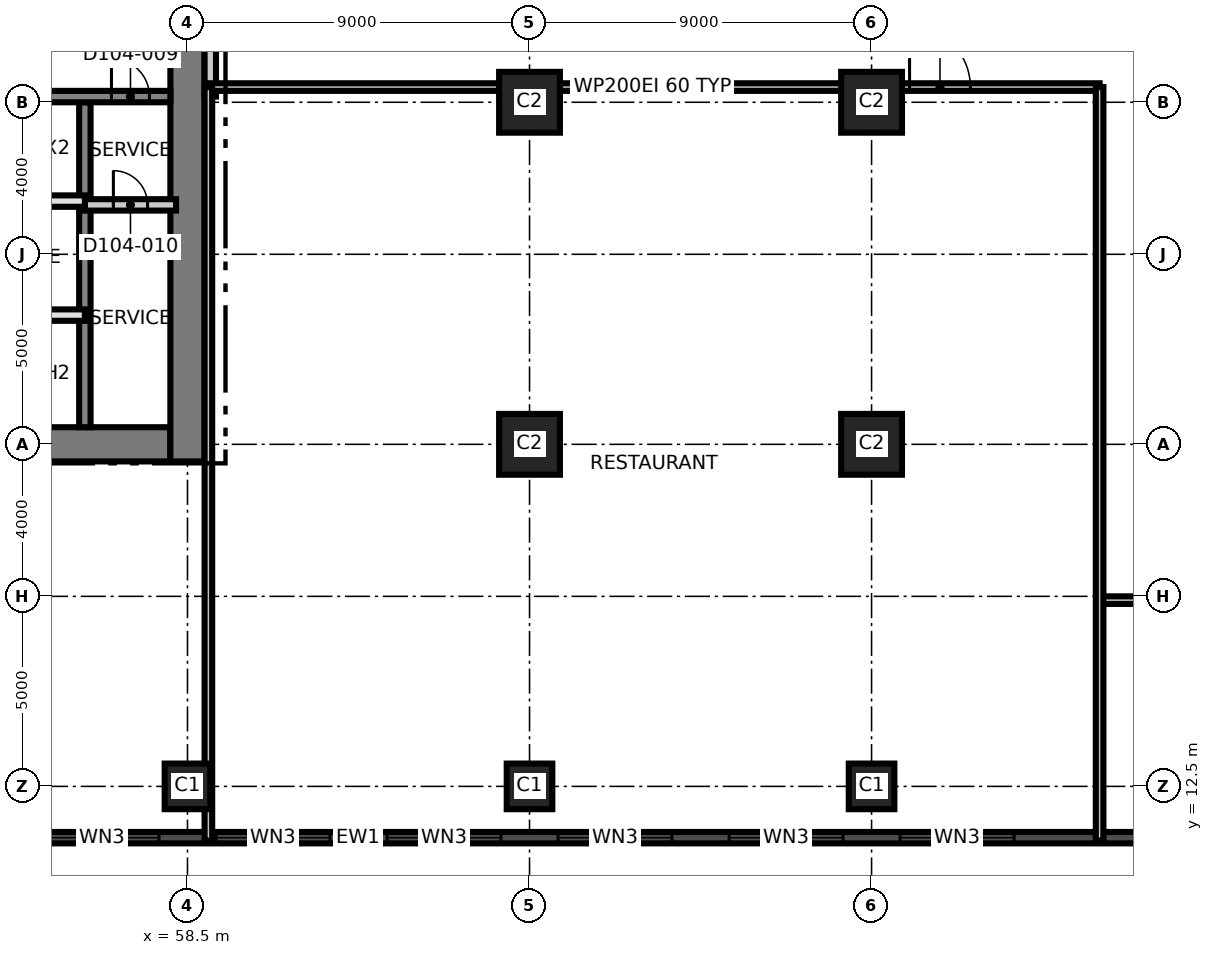
"""IFC4 building model, lengths in metres.
Left out: names, types, materials, properties, quantities, classifications, styles, units other than length and angle.
Written with IfcOpenShell. Run it as: python <this file> out.ifc"""

import sys

from ifc_helpers import new_model, si_unit, direction, frame, frame_2d, origin, origin_2d, place, context, subcontext, project, spatial, rectangle, extrude, element, fill, save


model = new_model("IFC4")
c1 = context("Model", 3, precision=1e-05, world=origin(), true_north=direction((0.0, 1.0)))
c2 = subcontext(c1, "Body", "Model", "MODEL_VIEW")
j1 = project(units=[si_unit("LENGTHUNIT", "METRE"), si_unit("PLANEANGLEUNIT", "RADIAN")], contexts=[c1])
p1 = place(None, origin())
s1 = spatial("IfcSite", under=j1, at=p1, CompositionType="ELEMENT")
p2 = place(p1, origin())
s2 = spatial("IfcBuilding", under=s1, at=p2, CompositionType="ELEMENT")
p3 = place(p2, frame((0.0, 0.0, 13.5)))
s3 = spatial("IfcBuildingStorey", under=s2, at=p3, CompositionType="ELEMENT", Elevation=13.5)
p4 = place(p3, frame((31.05, 21.5, 0.0), z_axis=(0.0, 0.0, 1.0), x_axis=(1.0, 0.0, 0.0)))
e1 = element("IfcWall", 1, at=p4, inside=s3, PredefinedType="SHEAR", context=c2, shape_type="SweptSolid", body=[
    extrude(rectangle(XDim=27.0, YDim=0.9, at=frame_2d((13.5, 0.0))), origin(), (0.0, 0.0, 1.0), 5.0),
])
p5 = place(p3, frame((58.5, 21.05, 0.0), z_axis=(0.0, 0.0, 1.0), x_axis=(0.0, 1.0, 0.0)))
e2 = element("IfcWall", 2, at=p5, inside=s3, PredefinedType="SHEAR", context=c2, shape_type="SweptSolid", body=[
    extrude(rectangle(XDim=18.9, YDim=0.9, at=frame_2d((9.45, 0.0))), origin(), (0.0, 0.0, 1.0), 5.0),
])
p6 = place(p3, frame((55.8, 21.95, 0.0), z_axis=(0.0, 0.0, 1.0), x_axis=(0.0, 1.0, 0.0)))
e3 = element("IfcWall", 3, at=p6, inside=s3, PredefinedType="SHEAR", context=c2, shape_type="SweptSolid", body=[
    extrude(rectangle(XDim=8.55, YDim=0.3, at=frame_2d((4.275, 0.0))), origin(), (0.0, 0.0, 1.0), 5.0),
])
p7 = place(p3, frame((31.95, 30.65, 0.0), z_axis=(0.0, 0.0, 1.0), x_axis=(1.0, 0.0, 0.0)))
e4 = element("IfcWall", 4, at=p7, inside=s3, PredefinedType="SHEAR", context=c2, shape_type="SweptSolid", body=[
    extrude(rectangle(XDim=26.1, YDim=0.3, at=frame_2d((13.05, 0.0))), origin(), (0.0, 0.0, 1.0), 5.0),
])
p8 = place(p7, frame((24.55, 0.0, 0.0)))
e5 = element("IfcOpeningElement", 5, at=p8, cuts=e4, PredefinedType="OPENING", context=c2, shape_type="SweptSolid", body=[
    extrude(rectangle(XDim=1.0, YDim=2.1, at=frame_2d((0.5, 1.05))), frame((0.0, 0.16, 0.0), z_axis=(0.0, -1.0, 0.0), x_axis=(1.0, 0.0, 0.0)), (0.0, 0.0, 1.0), 0.32),
])
p9 = place(p7, frame((11.35, 0.0, 0.0)))
e6 = element("IfcOpeningElement", 6, at=p9, cuts=e4, PredefinedType="OPENING", context=c2, shape_type="SweptSolid", body=[
    extrude(rectangle(XDim=1.0, YDim=2.1, at=frame_2d((0.5, 1.05))), frame((0.0, 0.16, 0.0), z_axis=(0.0, -1.0, 0.0), x_axis=(1.0, 0.0, 0.0)), (0.0, 0.0, 1.0), 0.32),
])
for number, where, z_axis, x_axis in (
    (7, (58.5, 12.5, 0.0), (0.0, 0.0, 1.0), (1.0, 0.0, 0.0)),
    (8, (67.5, 12.5, 0.0), (0.0, 0.0, 1.0), (1.0, 0.0, 0.0)),
    (9, (76.5, 12.5, 0.0), (0.0, 0.0, 1.0), (1.0, 0.0, 0.0)),
):
    element("IfcColumn", number, at=place(p3, frame(where, z_axis=z_axis, x_axis=x_axis)), inside=s3, PredefinedType="COLUMN", context=c2, shape_type="SweptSolid", body=[
        extrude(rectangle(XDim=1.2, YDim=1.2, at=origin_2d()), origin(), (0.0, 0.0, 1.0), 5.0),
    ])
for number, where, z_axis, x_axis in (
    (10, (67.5, 21.5, 0.0), (0.0, 0.0, 1.0), (1.0, 0.0, 0.0)),
    (11, (76.5, 21.5, 0.0), (0.0, 0.0, 1.0), (1.0, 0.0, 0.0)),
    (12, (67.5, 30.5, 0.0), (0.0, 0.0, 1.0), (1.0, 0.0, 0.0)),
    (13, (76.5, 30.5, 0.0), (0.0, 0.0, 1.0), (1.0, 0.0, 0.0)),
):
    element("IfcColumn", number, at=place(p3, frame(where, z_axis=z_axis, x_axis=x_axis)), inside=s3, PredefinedType="COLUMN", context=c2, shape_type="SweptSolid", body=[
        extrude(rectangle(XDim=1.6, YDim=1.6, at=origin_2d()), origin(), (0.0, 0.0, 1.0), 5.0),
    ])
p10 = place(p3, frame((27.048, 11.15, 0.0), z_axis=(0.0, 0.0, 1.0), x_axis=(1.0, 0.0, 0.0)))
e14 = element("IfcWall", 14, at=p10, inside=s3, PredefinedType="SOLIDWALL", context=c2, shape_type="SweptSolid", body=[
    extrude(rectangle(XDim=71.88, YDim=0.3, at=frame_2d((35.94, 0.0))), origin(), (0.0, 0.0, 1.0), 4.7),
])
p11 = place(p10, frame((0.726, 0.0, 0.9)))
e15 = element("IfcOpeningElement", 15, at=p11, cuts=e14, PredefinedType="OPENING", context=c2, shape_type="SweptSolid", body=[
    extrude(rectangle(XDim=3.0, YDim=2.4, at=frame_2d((1.5, 1.2))), frame((0.0, 0.16, 0.0), z_axis=(0.0, -1.0, 0.0), x_axis=(1.0, 0.0, 0.0)), (0.0, 0.0, 1.0), 0.32),
])
p12 = place(p10, frame((5.202, 0.0, 0.9)))
e16 = element("IfcOpeningElement", 16, at=p12, cuts=e14, PredefinedType="OPENING", context=c2, shape_type="SweptSolid", body=[
    extrude(rectangle(XDim=3.0, YDim=2.4, at=frame_2d((1.5, 1.2))), frame((0.0, 0.16, 0.0), z_axis=(0.0, -1.0, 0.0), x_axis=(1.0, 0.0, 0.0)), (0.0, 0.0, 1.0), 0.32),
])
p13 = place(p10, frame((9.702, 0.0, 0.9)))
e17 = element("IfcOpeningElement", 17, at=p13, cuts=e14, PredefinedType="OPENING", context=c2, shape_type="SweptSolid", body=[
    extrude(rectangle(XDim=3.0, YDim=2.4, at=frame_2d((1.5, 1.2))), frame((0.0, 0.16, 0.0), z_axis=(0.0, -1.0, 0.0), x_axis=(1.0, 0.0, 0.0)), (0.0, 0.0, 1.0), 0.32),
])
p14 = place(p10, frame((14.202, 0.0, 0.9)))
e18 = element("IfcOpeningElement", 18, at=p14, cuts=e14, PredefinedType="OPENING", context=c2, shape_type="SweptSolid", body=[
    extrude(rectangle(XDim=3.0, YDim=2.4, at=frame_2d((1.5, 1.2))), frame((0.0, 0.16, 0.0), z_axis=(0.0, -1.0, 0.0), x_axis=(1.0, 0.0, 0.0)), (0.0, 0.0, 1.0), 0.32),
])
p15 = place(p10, frame((18.702, 0.0, 0.9)))
e19 = element("IfcOpeningElement", 19, at=p15, cuts=e14, PredefinedType="OPENING", context=c2, shape_type="SweptSolid", body=[
    extrude(rectangle(XDim=3.0, YDim=2.4, at=frame_2d((1.5, 1.2))), frame((0.0, 0.16, 0.0), z_axis=(0.0, -1.0, 0.0), x_axis=(1.0, 0.0, 0.0)), (0.0, 0.0, 1.0), 0.32),
])
p16 = place(p10, frame((23.202, 0.0, 0.9)))
e20 = element("IfcOpeningElement", 20, at=p16, cuts=e14, PredefinedType="OPENING", context=c2, shape_type="SweptSolid", body=[
    extrude(rectangle(XDim=3.0, YDim=2.4, at=frame_2d((1.5, 1.2))), frame((0.0, 0.16, 0.0), z_axis=(0.0, -1.0, 0.0), x_axis=(1.0, 0.0, 0.0)), (0.0, 0.0, 1.0), 0.32),
])
p17 = place(p10, frame((27.702, 0.0, 0.9)))
e21 = element("IfcOpeningElement", 21, at=p17, cuts=e14, PredefinedType="OPENING", context=c2, shape_type="SweptSolid", body=[
    extrude(rectangle(XDim=3.0, YDim=2.4, at=frame_2d((1.5, 1.2))), frame((0.0, 0.16, 0.0), z_axis=(0.0, -1.0, 0.0), x_axis=(1.0, 0.0, 0.0)), (0.0, 0.0, 1.0), 0.32),
])
p18 = place(p10, frame((32.202, 0.0, 0.9)))
e22 = element("IfcOpeningElement", 22, at=p18, cuts=e14, PredefinedType="OPENING", context=c2, shape_type="SweptSolid", body=[
    extrude(rectangle(XDim=3.0, YDim=2.4, at=frame_2d((1.5, 1.2))), frame((0.0, 0.16, 0.0), z_axis=(0.0, -1.0, 0.0), x_axis=(1.0, 0.0, 0.0)), (0.0, 0.0, 1.0), 0.32),
])
p19 = place(p10, frame((36.702, 0.0, 0.9)))
e23 = element("IfcOpeningElement", 23, at=p19, cuts=e14, PredefinedType="OPENING", context=c2, shape_type="SweptSolid", body=[
    extrude(rectangle(XDim=3.0, YDim=2.4, at=frame_2d((1.5, 1.2))), frame((0.0, 0.16, 0.0), z_axis=(0.0, -1.0, 0.0), x_axis=(1.0, 0.0, 0.0)), (0.0, 0.0, 1.0), 0.32),
])
p20 = place(p10, frame((41.202, 0.0, 0.9)))
e24 = element("IfcOpeningElement", 24, at=p20, cuts=e14, PredefinedType="OPENING", context=c2, shape_type="SweptSolid", body=[
    extrude(rectangle(XDim=3.0, YDim=2.4, at=frame_2d((1.5, 1.2))), frame((0.0, 0.16, 0.0), z_axis=(0.0, -1.0, 0.0), x_axis=(1.0, 0.0, 0.0)), (0.0, 0.0, 1.0), 0.32),
])
p21 = place(p10, frame((45.702, 0.0, 0.9)))
e25 = element("IfcOpeningElement", 25, at=p21, cuts=e14, PredefinedType="OPENING", context=c2, shape_type="SweptSolid", body=[
    extrude(rectangle(XDim=3.0, YDim=2.4, at=frame_2d((1.5, 1.2))), frame((0.0, 0.16, 0.0), z_axis=(0.0, -1.0, 0.0), x_axis=(1.0, 0.0, 0.0)), (0.0, 0.0, 1.0), 0.32),
])
p22 = place(p10, frame((50.202, 0.0, 0.9)))
e26 = element("IfcOpeningElement", 26, at=p22, cuts=e14, PredefinedType="OPENING", context=c2, shape_type="SweptSolid", body=[
    extrude(rectangle(XDim=3.0, YDim=2.4, at=frame_2d((1.5, 1.2))), frame((0.0, 0.16, 0.0), z_axis=(0.0, -1.0, 0.0), x_axis=(1.0, 0.0, 0.0)), (0.0, 0.0, 1.0), 0.32),
])
p23 = place(p10, frame((59.202, 0.0, 0.9)))
e27 = element("IfcOpeningElement", 27, at=p23, cuts=e14, PredefinedType="OPENING", context=c2, shape_type="SweptSolid", body=[
    extrude(rectangle(XDim=3.0, YDim=2.4, at=frame_2d((1.5, 1.2))), frame((0.0, 0.16, 0.0), z_axis=(0.0, -1.0, 0.0), x_axis=(1.0, 0.0, 0.0)), (0.0, 0.0, 1.0), 0.32),
])
p24 = place(p10, frame((63.702, 0.0, 0.9)))
e28 = element("IfcOpeningElement", 28, at=p24, cuts=e14, PredefinedType="OPENING", context=c2, shape_type="SweptSolid", body=[
    extrude(rectangle(XDim=3.0, YDim=2.4, at=frame_2d((1.5, 1.2))), frame((0.0, 0.16, 0.0), z_axis=(0.0, -1.0, 0.0), x_axis=(1.0, 0.0, 0.0)), (0.0, 0.0, 1.0), 0.32),
])
p25 = place(p10, frame((68.226, 0.0, 0.9)))
e29 = element("IfcOpeningElement", 29, at=p25, cuts=e14, PredefinedType="OPENING", context=c2, shape_type="SweptSolid", body=[
    extrude(rectangle(XDim=3.0, YDim=2.4, at=frame_2d((1.5, 1.2))), frame((0.0, 0.16, 0.0), z_axis=(0.0, -1.0, 0.0), x_axis=(1.0, 0.0, 0.0)), (0.0, 0.0, 1.0), 0.32),
])
p26 = place(p3, frame((46.8, 24.9, 0.0), z_axis=(0.0, 0.0, 1.0), x_axis=(1.0, 0.0, 0.0)))
e30 = element("IfcWall", 30, at=p26, inside=s3, PredefinedType="SOLIDWALL", context=c2, shape_type="SweptSolid", body=[
    extrude(rectangle(XDim=9.0, YDim=0.3, at=frame_2d((4.5, 0.0))), origin(), (0.0, 0.0, 1.0), 4.7),
])
p27 = place(p26, frame((1.05, 0.0, 0.0)))
e31 = element("IfcOpeningElement", 31, at=p27, cuts=e30, PredefinedType="OPENING", context=c2, shape_type="SweptSolid", body=[
    extrude(rectangle(XDim=0.9, YDim=2.1, at=frame_2d((0.45, 1.05))), frame((0.0, 0.16, 0.0), z_axis=(0.0, -1.0, 0.0), x_axis=(1.0, 0.0, 0.0)), (0.0, 0.0, 1.0), 0.32),
])
p28 = place(p3, frame((55.8, 27.8, 0.0), z_axis=(0.0, 0.0, 1.0), x_axis=(1.0, 0.0, 0.0)))
e32 = element("IfcWall", 32, at=p28, inside=s3, PredefinedType="PARTITIONING", context=c2, shape_type="SweptSolid", body=[
    extrude(rectangle(XDim=2.4, YDim=0.3, at=frame_2d((1.2, 0.0))), origin(), (0.0, 0.0, 1.0), 4.7),
])
p29 = place(p28, frame((0.75, 0.0, 0.0)))
e33 = element("IfcOpeningElement", 33, at=p29, cuts=e32, PredefinedType="OPENING", context=c2, shape_type="SweptSolid", body=[
    extrude(rectangle(XDim=0.9, YDim=2.1, at=frame_2d((0.45, 1.05))), frame((0.0, 0.16, 0.0), z_axis=(0.0, -1.0, 0.0), x_axis=(1.0, 0.0, 0.0)), (0.0, 0.0, 1.0), 0.32),
])
p30 = place(p3, frame((49.8, 27.9, 0.0), z_axis=(0.0, 0.0, 1.0), x_axis=(1.0, 0.0, 0.0)))
e34 = element("IfcWall", 34, at=p30, inside=s3, PredefinedType="SOLIDWALL", context=c2, shape_type="SweptSolid", body=[
    extrude(rectangle(XDim=6.0, YDim=0.3, at=frame_2d((3.0, 0.0))), origin(), (0.0, 0.0, 1.0), 4.7),
])
p31 = place(p3, frame((59.1, 30.65, 0.0), z_axis=(0.0, 0.0, 1.0), x_axis=(0.0, 1.0, 0.0)))
e35 = element("IfcWall", 35, at=p31, inside=s3, PredefinedType="PARTITIONING", context=c2, shape_type="SweptSolid", body=[
    extrude(rectangle(XDim=2.7, YDim=0.3, at=frame_2d((1.35, 0.0))), origin(), (0.0, 0.0, 1.0), 4.7),
])
p32 = place(p3, frame((82.5, 17.4, 0.0), z_axis=(0.0, 0.0, 1.0), x_axis=(1.0, 0.0, 0.0)))
e36 = element("IfcWall", 36, at=p32, inside=s3, PredefinedType="PARTITIONING", context=c2, shape_type="SweptSolid", body=[
    extrude(rectangle(XDim=2.1, YDim=0.2, at=frame_2d((1.05, 0.0))), origin(), (0.0, 0.0, 1.0), 4.7),
])
p33 = place(p3, frame((58.97, 30.9, 0.0), z_axis=(0.0, 0.0, 1.0), x_axis=(1.0, 0.0, 0.0)))
e37 = element("IfcWall", 37, at=p33, inside=s3, PredefinedType="PARTITIONING", context=c2, shape_type="SweptSolid", body=[
    extrude(rectangle(XDim=23.53, YDim=0.2, at=frame_2d((11.765, 0.0))), origin(), (0.0, 0.0, 1.0), 4.7),
])
p34 = place(p33, frame((18.53, 0.0, 0.0)))
e38 = element("IfcOpeningElement", 38, at=p34, cuts=e37, PredefinedType="OPENING", context=c2, shape_type="SweptSolid", body=[
    extrude(rectangle(XDim=1.6, YDim=2.1, at=frame_2d((0.8, 1.05))), frame((0.0, 0.11, 0.0), z_axis=(0.0, -1.0, 0.0), x_axis=(1.0, 0.0, 0.0)), (0.0, 0.0, 1.0), 0.22),
])
for number, where, z_axis, x_axis in (
    (39, (59.05, 11.07, 0.0), (0.0, 0.0, 1.0), (0.0, 1.0, 0.0)),
    (40, (82.5, 11.07, 0.0), (0.0, 0.0, 1.0), (0.0, 1.0, 0.0)),
):
    element("IfcWall", number, at=place(p3, frame(where, z_axis=z_axis, x_axis=x_axis)), inside=s3, PredefinedType="PARTITIONING", context=c2, shape_type="SweptSolid", body=[
        extrude(rectangle(XDim=19.83, YDim=0.2, at=frame_2d((9.915, 0.0))), origin(), (0.0, 0.0, 1.0), 4.7),
    ])
p35 = place(p17, origin())
e41 = element("IfcWindow", 41, at=p35, inside=s3, PartitioningType="SINGLE_PANEL", PredefinedType="WINDOW", context=c2, shape_type="SweptSolid", body=[
    extrude(rectangle(XDim=3.0, YDim=2.4, at=frame_2d((1.5, 1.2))), frame((0.0, 0.03, 0.0), z_axis=(0.0, -1.0, 0.0), x_axis=(1.0, 0.0, 0.0)), (0.0, 0.0, 1.0), 0.06),
])
fill(e21, e41)
p36 = place(p18, origin())
e42 = element("IfcWindow", 42, at=p36, inside=s3, PartitioningType="SINGLE_PANEL", PredefinedType="WINDOW", context=c2, shape_type="SweptSolid", body=[
    extrude(rectangle(XDim=3.0, YDim=2.4, at=frame_2d((1.5, 1.2))), frame((0.0, 0.03, 0.0), z_axis=(0.0, -1.0, 0.0), x_axis=(1.0, 0.0, 0.0)), (0.0, 0.0, 1.0), 0.06),
])
fill(e22, e42)
p37 = place(p19, origin())
e43 = element("IfcWindow", 43, at=p37, inside=s3, PartitioningType="SINGLE_PANEL", PredefinedType="WINDOW", context=c2, shape_type="SweptSolid", body=[
    extrude(rectangle(XDim=3.0, YDim=2.4, at=frame_2d((1.5, 1.2))), frame((0.0, 0.03, 0.0), z_axis=(0.0, -1.0, 0.0), x_axis=(1.0, 0.0, 0.0)), (0.0, 0.0, 1.0), 0.06),
])
fill(e23, e43)
p38 = place(p20, origin())
e44 = element("IfcWindow", 44, at=p38, inside=s3, PartitioningType="SINGLE_PANEL", PredefinedType="WINDOW", context=c2, shape_type="SweptSolid", body=[
    extrude(rectangle(XDim=3.0, YDim=2.4, at=frame_2d((1.5, 1.2))), frame((0.0, 0.03, 0.0), z_axis=(0.0, -1.0, 0.0), x_axis=(1.0, 0.0, 0.0)), (0.0, 0.0, 1.0), 0.06),
])
fill(e24, e44)
p39 = place(p21, origin())
e45 = element("IfcWindow", 45, at=p39, inside=s3, PartitioningType="SINGLE_PANEL", PredefinedType="WINDOW", context=c2, shape_type="SweptSolid", body=[
    extrude(rectangle(XDim=3.0, YDim=2.4, at=frame_2d((1.5, 1.2))), frame((0.0, 0.03, 0.0), z_axis=(0.0, -1.0, 0.0), x_axis=(1.0, 0.0, 0.0)), (0.0, 0.0, 1.0), 0.06),
])
fill(e25, e45)
p40 = place(p22, origin())
e46 = element("IfcWindow", 46, at=p40, inside=s3, PartitioningType="SINGLE_PANEL", PredefinedType="WINDOW", context=c2, shape_type="SweptSolid", body=[
    extrude(rectangle(XDim=3.0, YDim=2.4, at=frame_2d((1.5, 1.2))), frame((0.0, 0.03, 0.0), z_axis=(0.0, -1.0, 0.0), x_axis=(1.0, 0.0, 0.0)), (0.0, 0.0, 1.0), 0.06),
])
fill(e26, e46)
p41 = place(p8, origin())
e47 = element("IfcDoor", 47, at=p41, inside=s3, OperationType="SINGLE_SWING_LEFT", PredefinedType="DOOR", context=c2, shape_type="SweptSolid", body=[
    extrude(rectangle(XDim=1.0, YDim=2.1, at=frame_2d((0.5, 1.05))), frame((0.0, 0.025, 0.0), z_axis=(0.0, -1.0, 0.0), x_axis=(1.0, 0.0, 0.0)), (0.0, 0.0, 1.0), 0.05),
])
fill(e5, e47)
p42 = place(p29, origin())
e48 = element("IfcDoor", 48, at=p42, inside=s3, OperationType="SINGLE_SWING_RIGHT", PredefinedType="DOOR", context=c2, shape_type="SweptSolid", body=[
    extrude(rectangle(XDim=0.9, YDim=2.1, at=frame_2d((0.45, 1.05))), frame((0.0, 0.025, 0.0), z_axis=(0.0, -1.0, 0.0), x_axis=(1.0, 0.0, 0.0)), (0.0, 0.0, 1.0), 0.05),
])
fill(e33, e48)
p43 = place(p34, origin())
e49 = element("IfcDoor", 49, at=p43, inside=s3, OperationType="SINGLE_SWING_RIGHT", PredefinedType="DOOR", context=c2, shape_type="SweptSolid", body=[
    extrude(rectangle(XDim=1.6, YDim=2.1, at=frame_2d((0.8, 1.05))), frame((0.0, 0.025, 0.0), z_axis=(0.0, -1.0, 0.0), x_axis=(1.0, 0.0, 0.0)), (0.0, 0.0, 1.0), 0.05),
])
fill(e38, e49)
save(model, sys.argv[1])
